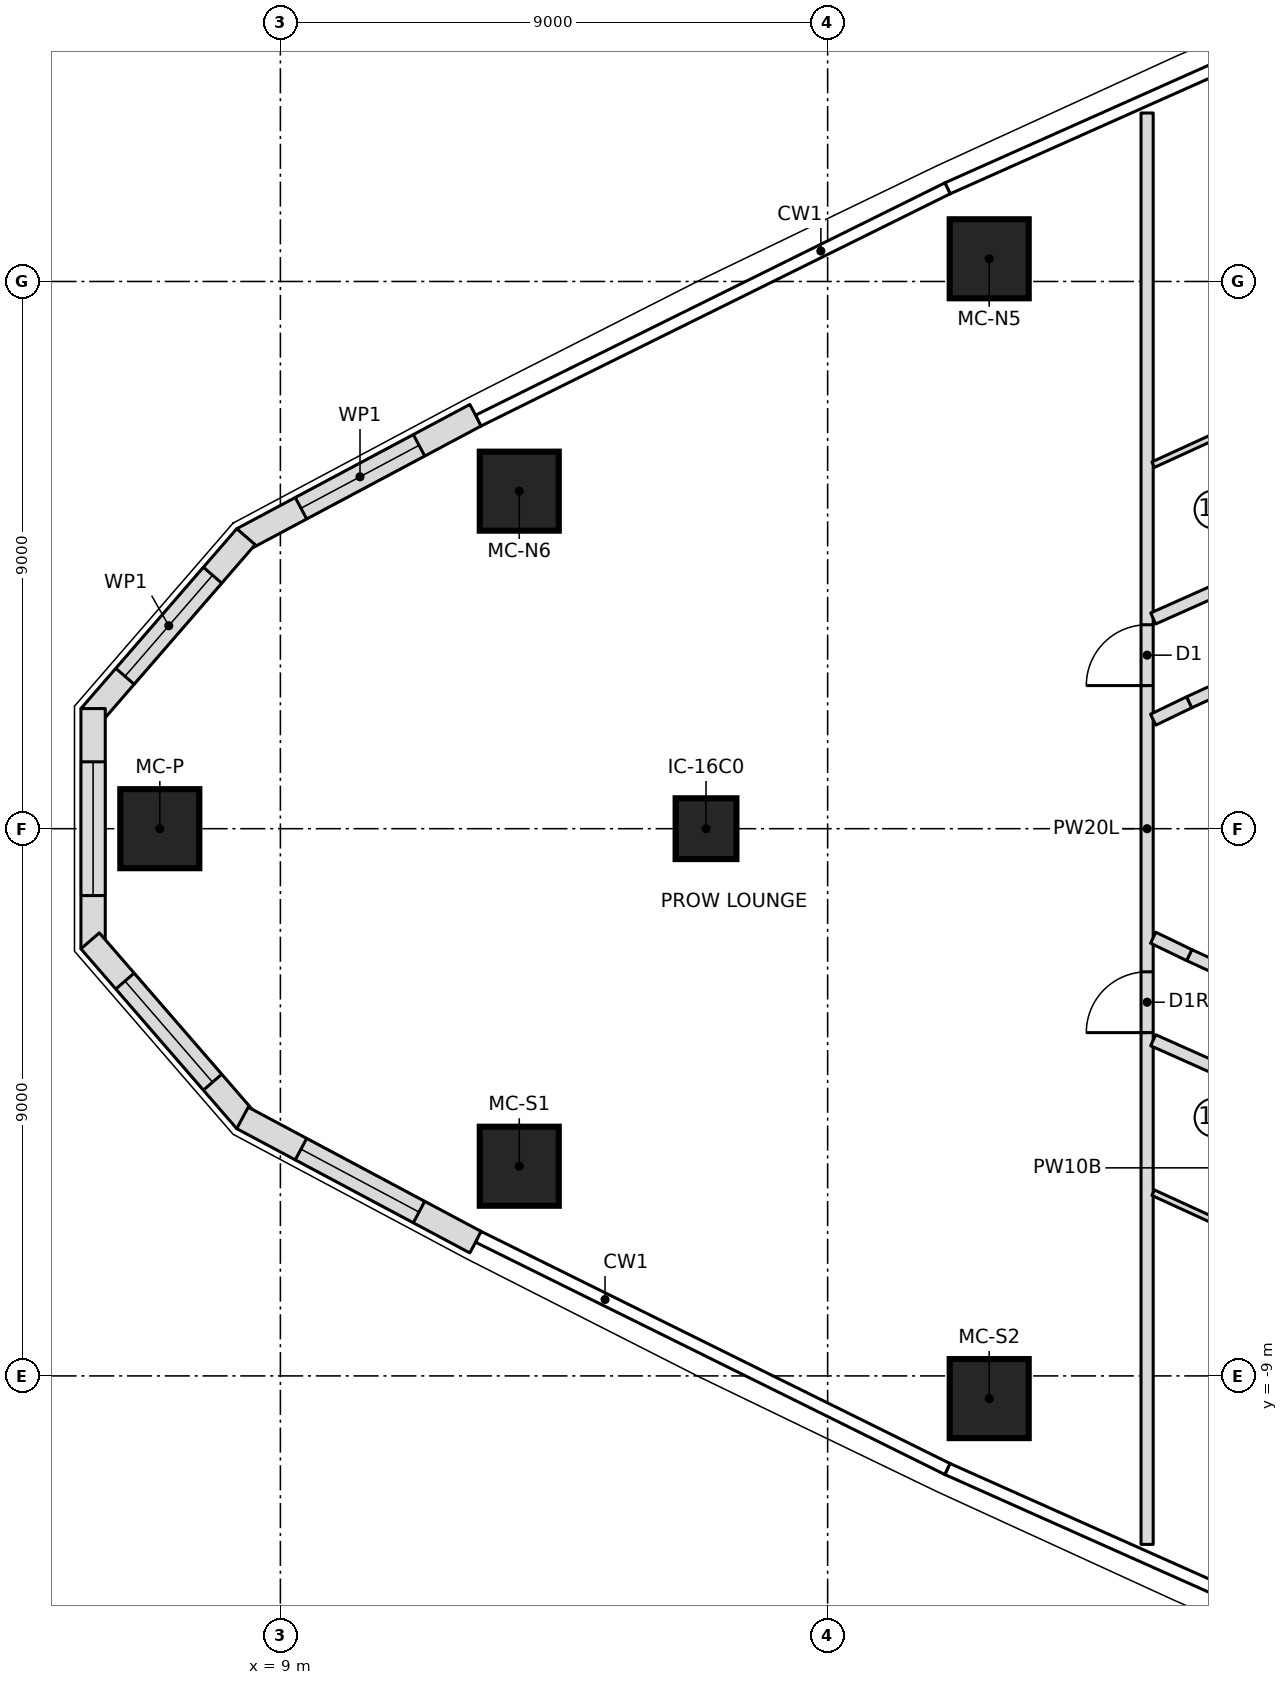
"""IFC4 building model, lengths in metres.
Left out: names, types, materials, properties, quantities, classifications, styles, units other than length and angle.
Written with IfcOpenShell. Run it as: python <this file> out.ifc"""

import sys

from ifc_helpers import new_model, si_unit, direction, frame, frame_2d, origin, origin_2d, place, context, subcontext, project, spatial, polyline, rectangle, outline, extrude, element, fill, save


model = new_model("IFC4")
c1 = context("Model", 3, precision=1e-05, world=origin(), true_north=direction((0.0, 1.0)))
c2 = subcontext(c1, "Body", "Model", "MODEL_VIEW")
j1 = project(units=[si_unit("LENGTHUNIT", "METRE"), si_unit("PLANEANGLEUNIT", "RADIAN")], contexts=[c1])
p1 = place(None, origin())
s1 = spatial("IfcSite", under=j1, at=p1, CompositionType="ELEMENT")
p2 = place(p1, origin())
s2 = spatial("IfcBuilding", under=s1, at=p2, CompositionType="ELEMENT")
p3 = place(p2, frame((0.0, 0.0, 207.45)))
s3 = spatial("IfcBuildingStorey", under=s2, at=p3, CompositionType="ELEMENT", Elevation=207.45)
for number, where, z_axis, x_axis in (
    (1, (7.017, 0.0, 0.0), (0.0, 0.0, 1.0), (1.0, 0.0, 0.0)),
    (2, (12.929, -5.552, 0.0), (0.0, 0.0, 1.0), (1.0, 0.0, 0.0)),
    (3, (20.657, -9.373, 0.0), (0.0, 0.0, 1.0), (1.0, 0.0, 0.0)),
    (4, (20.657, 9.373, 0.0), (0.0, 0.0, 1.0), (1.0, 0.0, 0.0)),
    (5, (12.929, 5.552, 0.0), (0.0, 0.0, 1.0), (1.0, 0.0, 0.0)),
):
    element("IfcColumn", number, at=place(p3, frame(where, z_axis=z_axis, x_axis=x_axis)), inside=s3, PredefinedType="COLUMN", context=c2, shape_type="SweptSolid", body=[
        extrude(rectangle(XDim=1.3, YDim=1.3, at=origin_2d()), origin(), (0.0, 0.0, 1.0), 3.55),
    ])
p4 = place(p3, frame((16.0, 0.0, 0.0), z_axis=(0.0, 0.0, 1.0), x_axis=(1.0, 0.0, 0.0)))
e6 = element("IfcColumn", 6, at=p4, inside=s3, PredefinedType="COLUMN", context=c2, shape_type="SweptSolid", body=[
    extrude(rectangle(XDim=1.0, YDim=1.0, at=origin_2d()), origin(), (0.0, 0.0, 1.0), 3.55),
])
p5 = place(p3, frame((12.21, 6.801, 0.0), z_axis=(0.0, 0.0, 1.0), x_axis=(-0.882385889746, -0.470526451518, 0.0)))
e7 = element("IfcWall", 7, at=p5, inside=s3, PredefinedType="NOTDEFINED", context=c2, shape_type="SweptSolid", body=[
    extrude(outline(polyline([(0.0, -0.2), (4.344, -0.2), (4.27, 0.2), (0.0, 0.2), (0.0, -0.2)])), origin(), (0.0, 0.0, 1.0), 3.25),
])
p6 = place(p5, frame((1.053, 0.0, 0.6)))
e8 = element("IfcOpeningElement", 8, at=p6, cuts=e7, PredefinedType="OPENING", context=c2, shape_type="SweptSolid", body=[
    extrude(outline(polyline([(0.0, 1.35), (0.084, 1.771), (0.322, 2.128), (0.679, 2.366), (1.1, 2.45), (1.521, 2.366), (1.878, 2.128), (2.116, 1.771), (2.2, 1.35), (2.2, 1.1), (2.116, 0.679), (1.878, 0.322), (1.521, 0.084), (1.1, 0.0), (0.679, 0.084), (0.322, 0.322), (0.084, 0.679), (0.0, 1.1), (0.0, 1.35)])), frame((0.0, 0.21, 0.0), z_axis=(0.0, -1.0, 0.0), x_axis=(1.0, 0.0, 0.0)), (0.0, 0.0, 1.0), 0.42),
])
p7 = place(p3, frame((8.409, 4.774, 0.0), z_axis=(0.0, 0.0, 1.0), x_axis=(-0.654759384203, -0.755837382509, 0.0)))
e9 = element("IfcWall", 9, at=p7, inside=s3, PredefinedType="NOTDEFINED", context=c2, shape_type="SweptSolid", body=[
    extrude(outline(polyline([(-0.037, -0.2), (3.876, -0.2), (3.727, 0.2), (0.037, 0.2), (-0.037, -0.2)])), origin(), (0.0, 0.0, 1.0), 3.25),
])
p8 = place(p7, frame((0.801, 0.0, 0.6)))
e10 = element("IfcOpeningElement", 10, at=p8, cuts=e9, PredefinedType="OPENING", context=c2, shape_type="SweptSolid", body=[
    extrude(outline(polyline([(0.0, 1.35), (0.084, 1.771), (0.322, 2.128), (0.679, 2.366), (1.1, 2.45), (1.521, 2.366), (1.878, 2.128), (2.116, 1.771), (2.2, 1.35), (2.2, 1.1), (2.116, 0.679), (1.878, 0.322), (1.521, 0.084), (1.1, 0.0), (0.679, 0.084), (0.322, 0.322), (0.084, 0.679), (0.0, 1.1), (0.0, 1.35)])), frame((0.0, 0.21, 0.0), z_axis=(0.0, -1.0, 0.0), x_axis=(1.0, 0.0, 0.0)), (0.0, 0.0, 1.0), 0.42),
])
p9 = place(p3, frame((5.92, 1.901, 0.0), z_axis=(0.0, 0.0, 1.0), x_axis=(0.0, -1.0, 0.0)))
e11 = element("IfcWall", 11, at=p9, inside=s3, PredefinedType="NOTDEFINED", context=c2, shape_type="SweptSolid", body=[
    extrude(outline(polyline([(-0.075, -0.2), (3.876, -0.2), (3.727, 0.2), (0.075, 0.2), (-0.075, -0.2)])), origin(), (0.0, 0.0, 1.0), 3.25),
])
p10 = place(p9, frame((0.801, 0.0, 0.6)))
e12 = element("IfcOpeningElement", 12, at=p10, cuts=e11, PredefinedType="OPENING", context=c2, shape_type="SweptSolid", body=[
    extrude(outline(polyline([(0.0, 1.35), (0.084, 1.771), (0.322, 2.128), (0.679, 2.366), (1.1, 2.45), (1.521, 2.366), (1.878, 2.128), (2.116, 1.771), (2.2, 1.35), (2.2, 1.1), (2.116, 0.679), (1.878, 0.322), (1.521, 0.084), (1.1, 0.0), (0.679, 0.084), (0.322, 0.322), (0.084, 0.679), (0.0, 1.1), (0.0, 1.35)])), frame((0.0, 0.21, 0.0), z_axis=(0.0, -1.0, 0.0), x_axis=(1.0, 0.0, 0.0)), (0.0, 0.0, 1.0), 0.42),
])
p11 = place(p3, frame((5.92, -1.901, 0.0), z_axis=(0.0, 0.0, 1.0), x_axis=(0.654759384203, -0.755837382509, 0.0)))
e13 = element("IfcWall", 13, at=p11, inside=s3, PredefinedType="NOTDEFINED", context=c2, shape_type="SweptSolid", body=[
    extrude(outline(polyline([(-0.075, -0.2), (3.839, -0.2), (3.765, 0.2), (0.075, 0.2), (-0.075, -0.2)])), origin(), (0.0, 0.0, 1.0), 3.25),
])
p12 = place(p11, frame((0.801, 0.0, 0.6)))
e14 = element("IfcOpeningElement", 14, at=p12, cuts=e13, PredefinedType="OPENING", context=c2, shape_type="SweptSolid", body=[
    extrude(outline(polyline([(0.0, 1.35), (0.084, 1.771), (0.322, 2.128), (0.679, 2.366), (1.1, 2.45), (1.521, 2.366), (1.878, 2.128), (2.116, 1.771), (2.2, 1.35), (2.2, 1.1), (2.116, 0.679), (1.878, 0.322), (1.521, 0.084), (1.1, 0.0), (0.679, 0.084), (0.322, 0.322), (0.084, 0.679), (0.0, 1.1), (0.0, 1.35)])), frame((0.0, 0.21, 0.0), z_axis=(0.0, -1.0, 0.0), x_axis=(1.0, 0.0, 0.0)), (0.0, 0.0, 1.0), 0.42),
])
p13 = place(p3, frame((8.409, -4.774, 0.0), z_axis=(0.0, 0.0, 1.0), x_axis=(0.882385889746, -0.470526451518, 0.0)))
e15 = element("IfcWall", 15, at=p13, inside=s3, PredefinedType="NOTDEFINED", context=c2, shape_type="SweptSolid", body=[
    extrude(outline(polyline([(-0.037, -0.2), (4.307, -0.2), (4.307, 0.2), (0.037, 0.2), (-0.037, -0.2)])), origin(), (0.0, 0.0, 1.0), 3.25),
])
p14 = place(p13, frame((1.053, 0.0, 0.6)))
e16 = element("IfcOpeningElement", 16, at=p14, cuts=e15, PredefinedType="OPENING", context=c2, shape_type="SweptSolid", body=[
    extrude(outline(polyline([(0.0, 1.35), (0.084, 1.771), (0.322, 2.128), (0.679, 2.366), (1.1, 2.45), (1.521, 2.366), (1.878, 2.128), (2.116, 1.771), (2.2, 1.35), (2.2, 1.1), (2.116, 0.679), (1.878, 0.322), (1.521, 0.084), (1.1, 0.0), (0.679, 0.084), (0.322, 0.322), (0.084, 0.679), (0.0, 1.1), (0.0, 1.35)])), frame((0.0, 0.21, 0.0), z_axis=(0.0, -1.0, 0.0), x_axis=(1.0, 0.0, 0.0)), (0.0, 0.0, 1.0), 0.42),
])
p15 = place(p3, frame((23.254, -11.771, 0.0), z_axis=(0.0, 0.0, 1.0), x_axis=(0.0, 1.0, 0.0)))
e17 = element("IfcWall", 17, at=p15, inside=s3, PredefinedType="PARTITIONING", context=c2, shape_type="SweptSolid", body=[
    extrude(rectangle(XDim=23.542, YDim=0.2, at=frame_2d((11.771, 0.0))), origin(), (0.0, 0.0, 1.0), 3.15),
])
p16 = place(p15, frame((14.125, 0.0, 0.0)))
e18 = element("IfcOpeningElement", 18, at=p16, cuts=e17, PredefinedType="OPENING", context=c2, shape_type="SweptSolid", body=[
    extrude(rectangle(XDim=1.0, YDim=2.1, at=frame_2d((0.5, 1.05))), frame((0.0, 0.11, 0.0), z_axis=(0.0, -1.0, 0.0), x_axis=(1.0, 0.0, 0.0)), (0.0, 0.0, 1.0), 0.22),
])
p17 = place(p15, frame((8.417, 0.0, 0.0)))
e19 = element("IfcOpeningElement", 19, at=p17, cuts=e17, PredefinedType="OPENING", context=c2, shape_type="SweptSolid", body=[
    extrude(rectangle(XDim=1.0, YDim=2.1, at=frame_2d((0.5, 1.05))), frame((0.0, 0.11, 0.0), z_axis=(0.0, -1.0, 0.0), x_axis=(1.0, 0.0, 0.0)), (0.0, 0.0, 1.0), 0.22),
])
p18 = place(p3, frame((23.354, 3.458, 0.0), z_axis=(0.0, 0.0, 1.0), x_axis=(0.913485016927, 0.406872368009, 0.0)))
e20 = element("IfcWall", 20, at=p18, inside=s3, PredefinedType="PARTITIONING", context=c2, shape_type="SweptSolid", body=[
    extrude(rectangle(XDim=8.332, YDim=0.2, at=frame_2d((4.166, 0.0))), origin(), (0.0, 0.0, 1.0), 3.15),
])
p19 = place(p18, frame((3.05, 0.0, 0.0)))
e21 = element("IfcOpeningElement", 21, at=p19, cuts=e20, PredefinedType="OPENING", context=c2, shape_type="SweptSolid", body=[
    extrude(rectangle(XDim=1.0, YDim=2.1, at=frame_2d((0.5, 1.05))), frame((0.0, 0.11, 0.0), z_axis=(0.0, -1.0, 0.0), x_axis=(1.0, 0.0, 0.0)), (0.0, 0.0, 1.0), 0.22),
])
p20 = place(p3, frame((23.354, 5.987, 0.0), z_axis=(0.0, 0.0, 1.0), x_axis=(0.909158902999, 0.416449383597, 0.0)))
e22 = element("IfcWall", 22, at=p20, inside=s3, PredefinedType="PARTITIONING", context=c2, shape_type="SweptSolid", body=[
    extrude(rectangle(XDim=1.556, YDim=0.1, at=frame_2d((0.778, 0.0))), origin(), (0.0, 0.0, 1.0), 3.15),
])
p21 = place(p3, frame((23.354, -3.479, 0.0), z_axis=(0.0, 0.0, 1.0), x_axis=(0.913491969365, -0.406856758461, 0.0)))
e23 = element("IfcWall", 23, at=p21, inside=s3, PredefinedType="PARTITIONING", context=c2, shape_type="SweptSolid", body=[
    extrude(rectangle(XDim=8.324, YDim=0.2, at=frame_2d((4.162, 0.0))), origin(), (0.0, 0.0, 1.0), 3.15),
])
p22 = place(p21, frame((3.05, 0.0, 0.0)))
e24 = element("IfcOpeningElement", 24, at=p22, cuts=e23, PredefinedType="OPENING", context=c2, shape_type="SweptSolid", body=[
    extrude(rectangle(XDim=1.0, YDim=2.1, at=frame_2d((0.5, 1.05))), frame((0.0, 0.11, 0.0), z_axis=(0.0, -1.0, 0.0), x_axis=(1.0, 0.0, 0.0)), (0.0, 0.0, 1.0), 0.22),
])
p23 = place(p3, frame((24.769, -6.635, 0.0), z_axis=(0.0, 0.0, 1.0), x_axis=(-0.909158902999, 0.416449383597, 0.0)))
e25 = element("IfcWall", 25, at=p23, inside=s3, PredefinedType="PARTITIONING", context=c2, shape_type="SweptSolid", body=[
    extrude(rectangle(XDim=1.556, YDim=0.1, at=frame_2d((0.778, 0.0))), origin(), (0.0, 0.0, 1.0), 3.15),
])
p24 = place(p3, frame((27.69, -3.793, 0.0), z_axis=(0.0, 0.0, 1.0), x_axis=(-0.909180834404, 0.416401501382, 0.0)))
e26 = element("IfcWall", 26, at=p24, inside=s3, PredefinedType="PARTITIONING", context=c2, shape_type="SweptSolid", body=[
    extrude(rectangle(XDim=4.117, YDim=0.2, at=frame_2d((2.059, 0.0))), origin(), (0.0, 0.0, 1.0), 3.15),
])
p25 = place(p24, frame((1.559, 0.0, 0.0)))
e27 = element("IfcOpeningElement", 27, at=p25, cuts=e26, PredefinedType="OPENING", context=c2, shape_type="SweptSolid", body=[
    extrude(rectangle(XDim=1.0, YDim=2.1, at=frame_2d((0.5, 1.05))), frame((0.0, 0.11, 0.0), z_axis=(0.0, -1.0, 0.0), x_axis=(1.0, 0.0, 0.0)), (0.0, 0.0, 1.0), 0.22),
])
for number, where, z_axis, x_axis in (
    (28, (23.947, -2.079, 0.0), (0.0, 0.0, 1.0), (-0.901, 0.435, 0.0)),
    (29, (23.354, 1.793, 0.0), (0.0, 0.0, 1.0), (0.901, 0.435, 0.0)),
):
    element("IfcWall", number, at=place(p3, frame(where, z_axis=z_axis, x_axis=x_axis)), inside=s3, PredefinedType="PARTITIONING", context=c2, shape_type="SweptSolid", body=[
        extrude(rectangle(XDim=0.658, YDim=0.2, at=frame_2d((0.329, 0.0))), origin(), (0.0, 0.0, 1.0), 3.15),
    ])
p26 = place(p3, frame((23.947, 2.079, 0.0), z_axis=(0.0, 0.0, 1.0), x_axis=(0.909180834404, 0.416401501382, 0.0)))
e30 = element("IfcWall", 30, at=p26, inside=s3, PredefinedType="PARTITIONING", context=c2, shape_type="SweptSolid", body=[
    extrude(rectangle(XDim=4.117, YDim=0.2, at=frame_2d((2.059, 0.0))), origin(), (0.0, 0.0, 1.0), 3.15),
])
p27 = place(p6, origin())
e31 = element("IfcWindow", 31, at=p27, inside=s3, PartitioningType="SINGLE_PANEL", PredefinedType="WINDOW", context=c2, shape_type="SweptSolid", body=[
    extrude(outline(polyline([(0.0, 1.35), (0.084, 1.771), (0.322, 2.128), (0.679, 2.366), (1.1, 2.45), (1.521, 2.366), (1.878, 2.128), (2.116, 1.771), (2.2, 1.35), (2.2, 1.1), (2.116, 0.679), (1.878, 0.322), (1.521, 0.084), (1.1, 0.0), (0.679, 0.084), (0.322, 0.322), (0.084, 0.679), (0.0, 1.1), (0.0, 1.35)])), frame((0.0, 0.17, 0.0), z_axis=(0.0, -1.0, 0.0), x_axis=(1.0, 0.0, 0.0)), (0.0, 0.0, 1.0), 0.06),
])
fill(e8, e31)
p28 = place(p8, origin())
e32 = element("IfcWindow", 32, at=p28, inside=s3, PartitioningType="SINGLE_PANEL", PredefinedType="WINDOW", context=c2, shape_type="SweptSolid", body=[
    extrude(outline(polyline([(0.0, 1.35), (0.084, 1.771), (0.322, 2.128), (0.679, 2.366), (1.1, 2.45), (1.521, 2.366), (1.878, 2.128), (2.116, 1.771), (2.2, 1.35), (2.2, 1.1), (2.116, 0.679), (1.878, 0.322), (1.521, 0.084), (1.1, 0.0), (0.679, 0.084), (0.322, 0.322), (0.084, 0.679), (0.0, 1.1), (0.0, 1.35)])), frame((0.0, 0.17, 0.0), z_axis=(0.0, -1.0, 0.0), x_axis=(1.0, 0.0, 0.0)), (0.0, 0.0, 1.0), 0.06),
])
fill(e10, e32)
p29 = place(p10, origin())
e33 = element("IfcWindow", 33, at=p29, inside=s3, PartitioningType="SINGLE_PANEL", PredefinedType="WINDOW", context=c2, shape_type="SweptSolid", body=[
    extrude(outline(polyline([(0.0, 1.35), (0.084, 1.771), (0.322, 2.128), (0.679, 2.366), (1.1, 2.45), (1.521, 2.366), (1.878, 2.128), (2.116, 1.771), (2.2, 1.35), (2.2, 1.1), (2.116, 0.679), (1.878, 0.322), (1.521, 0.084), (1.1, 0.0), (0.679, 0.084), (0.322, 0.322), (0.084, 0.679), (0.0, 1.1), (0.0, 1.35)])), frame((0.0, 0.17, 0.0), z_axis=(0.0, -1.0, 0.0), x_axis=(1.0, 0.0, 0.0)), (0.0, 0.0, 1.0), 0.06),
])
fill(e12, e33)
p30 = place(p12, origin())
e34 = element("IfcWindow", 34, at=p30, inside=s3, PartitioningType="SINGLE_PANEL", PredefinedType="WINDOW", context=c2, shape_type="SweptSolid", body=[
    extrude(outline(polyline([(0.0, 1.35), (0.084, 1.771), (0.322, 2.128), (0.679, 2.366), (1.1, 2.45), (1.521, 2.366), (1.878, 2.128), (2.116, 1.771), (2.2, 1.35), (2.2, 1.1), (2.116, 0.679), (1.878, 0.322), (1.521, 0.084), (1.1, 0.0), (0.679, 0.084), (0.322, 0.322), (0.084, 0.679), (0.0, 1.1), (0.0, 1.35)])), frame((0.0, 0.17, 0.0), z_axis=(0.0, -1.0, 0.0), x_axis=(1.0, 0.0, 0.0)), (0.0, 0.0, 1.0), 0.06),
])
fill(e14, e34)
p31 = place(p14, origin())
e35 = element("IfcWindow", 35, at=p31, inside=s3, PartitioningType="SINGLE_PANEL", PredefinedType="WINDOW", context=c2, shape_type="SweptSolid", body=[
    extrude(outline(polyline([(0.0, 1.35), (0.084, 1.771), (0.322, 2.128), (0.679, 2.366), (1.1, 2.45), (1.521, 2.366), (1.878, 2.128), (2.116, 1.771), (2.2, 1.35), (2.2, 1.1), (2.116, 0.679), (1.878, 0.322), (1.521, 0.084), (1.1, 0.0), (0.679, 0.084), (0.322, 0.322), (0.084, 0.679), (0.0, 1.1), (0.0, 1.35)])), frame((0.0, 0.17, 0.0), z_axis=(0.0, -1.0, 0.0), x_axis=(1.0, 0.0, 0.0)), (0.0, 0.0, 1.0), 0.06),
])
fill(e16, e35)
p32 = place(p16, origin())
e36 = element("IfcDoor", 36, at=p32, inside=s3, OperationType="SINGLE_SWING_LEFT", PredefinedType="DOOR", context=c2, shape_type="SweptSolid", body=[
    extrude(rectangle(XDim=1.0, YDim=2.1, at=frame_2d((0.5, 1.05))), frame((0.0, 0.025, 0.0), z_axis=(0.0, -1.0, 0.0), x_axis=(1.0, 0.0, 0.0)), (0.0, 0.0, 1.0), 0.05),
])
fill(e18, e36)
p33 = place(p17, origin())
e37 = element("IfcDoor", 37, at=p33, inside=s3, OperationType="SINGLE_SWING_RIGHT", PredefinedType="DOOR", context=c2, shape_type="SweptSolid", body=[
    extrude(rectangle(XDim=1.0, YDim=2.1, at=frame_2d((0.5, 1.05))), frame((0.0, 0.025, 0.0), z_axis=(0.0, -1.0, 0.0), x_axis=(1.0, 0.0, 0.0)), (0.0, 0.0, 1.0), 0.05),
])
fill(e19, e37)
save(model, sys.argv[1])
